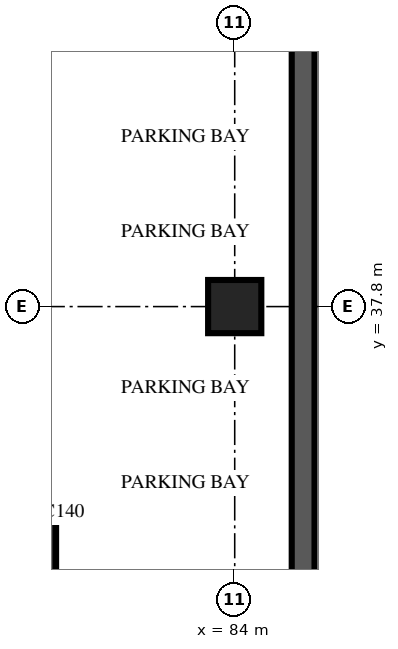
"""IFC4 building model, lengths in metres.
Left out: names, types, materials, properties, quantities, classifications, styles, units other than length and angle.
Written with IfcOpenShell. Run it as: python <this file> out.ifc"""

import sys

from ifc_helpers import new_model, si_unit, direction, frame, frame_2d, origin, origin_2d, place, context, subcontext, project, spatial, rectangle, extrude, source, transform, mapped, element, save


model = new_model("IFC4")
c1 = context("Model", 3, precision=1e-05, world=origin(), true_north=direction((0.0, 1.0)))
c2 = subcontext(c1, "Body", "Model", "MODEL_VIEW")
j1 = project(units=[si_unit("LENGTHUNIT", "METRE"), si_unit("PLANEANGLEUNIT", "RADIAN")], contexts=[c1])
p1 = place(None, origin())
s1 = spatial("IfcSite", under=j1, at=p1, CompositionType="ELEMENT")
p2 = place(p1, origin())
s2 = spatial("IfcBuilding", under=s1, at=p2, CompositionType="ELEMENT")
p3 = place(p2, frame((0.0, 0.0, -13.5)))
s3 = spatial("IfcBuildingStorey", under=s2, at=p3, CompositionType="ELEMENT", Elevation=-13.5)
m1 = source(origin(), c2, "Body", "SweptSolid", [
    extrude(rectangle(XDim=55.68, YDim=0.6, at=frame_2d((27.84, 0.0))), origin(), (0.0, 0.0, 1.0), 4.5),
])
p4 = place(p3, frame((85.8, -1.5, 0.0), z_axis=(0.0, 0.0, 1.0), x_axis=(0.0, 1.0, 0.0)))
e1 = element("IfcWall", 1, at=p4, inside=s3, PredefinedType="SOLIDWALL", context=c2, shape_type="MappedRepresentation", body=[
    mapped(m1, transform((0.0, 0.0, 0.0), scale=1.0)),
])
m2 = source(origin(), c2, "Body", "SweptSolid", [
    extrude(rectangle(XDim=1.4, YDim=1.4, at=origin_2d()), origin(), (0.0, 0.0, 1.0), 4.5),
])
for number, where, z_axis, x_axis in (
    (2, (78.6, 31.5, 0.0), (0.0, 0.0, 1.0), (1.0, 0.0, 0.0)),
    (3, (84.0, 37.8, 0.0), (0.0, 0.0, 1.0), (1.0, 0.0, 0.0)),
):
    element("IfcColumn", number, at=place(p3, frame(where, z_axis=z_axis, x_axis=x_axis)), inside=s3, PredefinedType="COLUMN", context=c2, shape_type="MappedRepresentation", body=[
        mapped(m2, transform((0.0, 0.0, 0.0), scale=1.0)),
    ])
save(model, sys.argv[1])
